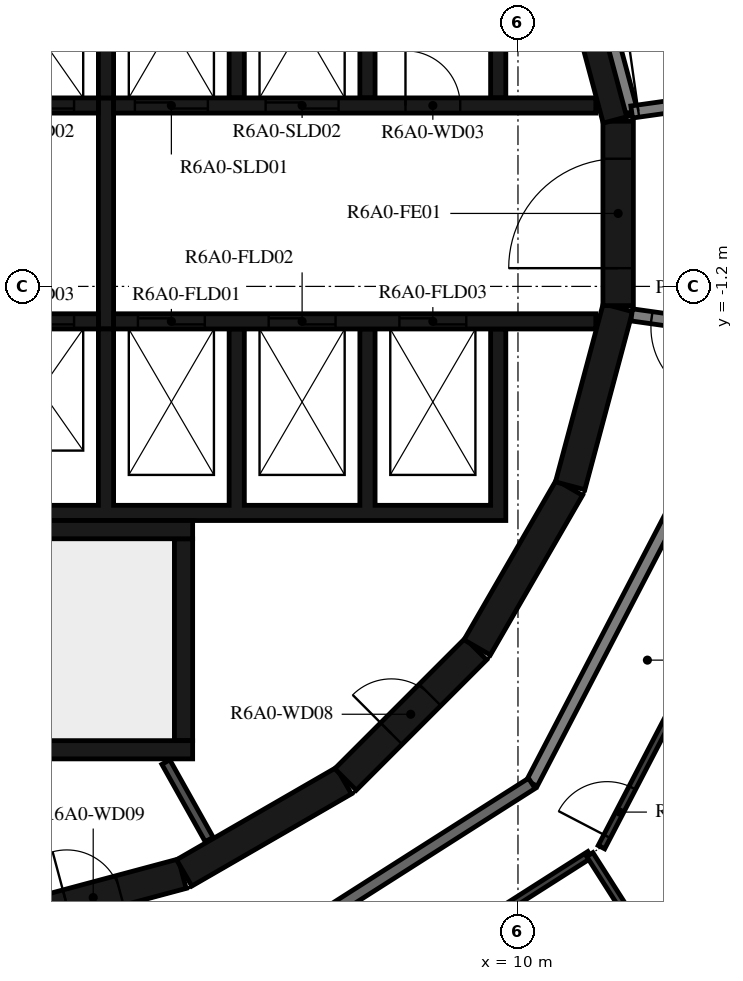
"""IFC4 building model, lengths in metres.
Left out: names, types, materials, properties, quantities, classifications, styles, units other than length and angle.
Written with IfcOpenShell. Run it as: python <this file> out.ifc"""

import sys

from ifc_helpers import new_model, si_unit, direction, frame, frame_2d, origin, place, context, subcontext, project, spatial, polyline, rectangle, outline, extrude, element, fill, save


model = new_model("IFC4")
c1 = context("Model", 3, precision=1e-05, world=origin(), true_north=direction((0.0, 1.0)))
c2 = subcontext(c1, "Body", "Model", "MODEL_VIEW")
j1 = project(units=[si_unit("LENGTHUNIT", "METRE"), si_unit("PLANEANGLEUNIT", "RADIAN")], contexts=[c1])
p1 = place(None, origin())
s1 = spatial("IfcSite", under=j1, at=p1, CompositionType="ELEMENT")
p2 = place(p1, origin())
s2 = spatial("IfcBuilding", under=s1, at=p2, CompositionType="ELEMENT")
p3 = place(p2, frame((0.0, 0.0, 233.7)))
s3 = spatial("IfcBuildingStorey", under=s2, at=p3, CompositionType="ELEMENT", Elevation=233.7)
p4 = place(p3, frame((1.55, -11.643, 0.0), z_axis=(0.0, 0.0, 1.0), x_axis=(0.965948410781, 0.258734743916, 0.0)))
e1 = element("IfcWall", 1, at=p4, inside=s3, PredefinedType="SHEAR", context=c2, shape_type="SweptSolid", body=[
    extrude(rectangle(XDim=3.033, YDim=0.5, at=frame_2d((1.516, 0.0))), origin(), (0.0, 0.0, 1.0), 3.12),
])
p5 = place(p4, frame((1.066, 0.0, 0.0)))
e2 = element("IfcOpeningElement", 2, at=p5, cuts=e1, PredefinedType="OPENING", context=c2, shape_type="SweptSolid", body=[
    extrude(rectangle(XDim=0.9, YDim=2.1, at=frame_2d((0.45, 1.05))), frame((0.0, 0.26, 0.0), z_axis=(0.0, -1.0, 0.0), x_axis=(1.0, 0.0, 0.0)), (0.0, 0.0, 1.0), 0.52),
])
p6 = place(p3, frame((4.51, -10.845, 0.0), z_axis=(0.0, 0.0, 1.0), x_axis=(0.865975092491, 0.500087131594, 0.0)))
e3 = element("IfcWall", 3, at=p6, inside=s3, PredefinedType="SHEAR", context=c2, shape_type="SweptSolid", body=[
    extrude(rectangle(XDim=3.033, YDim=0.5, at=frame_2d((1.516, 0.0))), origin(), (0.0, 0.0, 1.0), 3.12),
])
p7 = place(p3, frame((7.164, -9.308, 0.0), z_axis=(0.0, 0.0, 1.0), x_axis=(0.707106781187, 0.707106781187, 0.0)))
e4 = element("IfcWall", 4, at=p7, inside=s3, PredefinedType="SHEAR", context=c2, shape_type="SweptSolid", body=[
    extrude(rectangle(XDim=3.032, YDim=0.5, at=frame_2d((1.516, 0.0))), origin(), (0.0, 0.0, 1.0), 3.12),
])
p8 = place(p7, frame((1.066, 0.0, 0.0)))
e5 = element("IfcOpeningElement", 5, at=p8, cuts=e4, PredefinedType="OPENING", context=c2, shape_type="SweptSolid", body=[
    extrude(rectangle(XDim=0.9, YDim=2.1, at=frame_2d((0.45, 1.05))), frame((0.0, 0.26, 0.0), z_axis=(0.0, -1.0, 0.0), x_axis=(1.0, 0.0, 0.0)), (0.0, 0.0, 1.0), 0.52),
])
for number, where, z_axis, x_axis in (
    (6, (9.329, -7.137, 0.0), (0.0, 0.0, 1.0), (0.5, 0.866, 0.0)),
    (7, (10.858, -4.479, 0.0), (0.0, 0.0, 1.0), (0.259, 0.966, 0.0)),
):
    element("IfcWall", number, at=place(p3, frame(where, z_axis=z_axis, x_axis=x_axis)), inside=s3, PredefinedType="SHEAR", context=c2, shape_type="SweptSolid", body=[
        extrude(rectangle(XDim=3.033, YDim=0.5, at=frame_2d((1.516, 0.0))), origin(), (0.0, 0.0, 1.0), 3.12),
    ])
p9 = place(p3, frame((11.647, -1.516, 0.0), z_axis=(0.0, 0.0, 1.0), x_axis=(0.0, 1.0, 0.0)))
e8 = element("IfcWall", 8, at=p9, inside=s3, PredefinedType="SHEAR", context=c2, shape_type="SweptSolid", body=[
    extrude(rectangle(XDim=3.033, YDim=0.5, at=frame_2d((1.516, 0.0))), origin(), (0.0, 0.0, 1.0), 3.12),
])
p10 = place(p9, frame((0.616, 0.0, 0.0)))
e9 = element("IfcOpeningElement", 9, at=p10, cuts=e8, PredefinedType="OPENING", context=c2, shape_type="SweptSolid", body=[
    extrude(rectangle(XDim=1.8, YDim=2.1, at=frame_2d((0.9, 1.05))), frame((0.0, 0.26, 0.0), z_axis=(0.0, -1.0, 0.0), x_axis=(1.0, 0.0, 0.0)), (0.0, 0.0, 1.0), 0.52),
])
p11 = place(p3, frame((11.643, 1.55, 0.0), z_axis=(0.0, 0.0, 1.0), x_axis=(-0.258734743916, 0.965948410781, 0.0)))
e10 = element("IfcWall", 10, at=p11, inside=s3, PredefinedType="SHEAR", context=c2, shape_type="SweptSolid", body=[
    extrude(rectangle(XDim=3.033, YDim=0.5, at=frame_2d((1.516, 0.0))), origin(), (0.0, 0.0, 1.0), 3.12),
])
p12 = place(p3, frame((-2.4, -5.2, 0.0), z_axis=(0.0, 0.0, 1.0), x_axis=(1.0, 0.0, 0.0)))
e11 = element("IfcWall", 11, at=p12, inside=s3, PredefinedType="SHEAR", context=c2, shape_type="SweptSolid", body=[
    extrude(rectangle(XDim=7.05, YDim=0.3, at=frame_2d((3.525, 0.0))), origin(), (0.0, 0.0, 1.0), 3.12),
])
p13 = place(p3, frame((4.5, -8.67, 0.0), z_axis=(0.0, 0.0, 1.0), x_axis=(0.0, 1.0, 0.0)))
e12 = element("IfcWall", 12, at=p13, inside=s3, PredefinedType="SHEAR", context=c2, shape_type="SweptSolid", body=[
    extrude(rectangle(XDim=3.32, YDim=0.3, at=frame_2d((1.66, 0.0))), origin(), (0.0, 0.0, 1.0), 3.12),
])
p14 = place(p3, frame((0.1, -8.82, 0.0), z_axis=(0.0, 0.0, 1.0), x_axis=(1.0, 0.0, 0.0)))
e13 = element("IfcWall", 13, at=p14, inside=s3, PredefinedType="SHEAR", context=c2, shape_type="SweptSolid", body=[
    extrude(rectangle(XDim=4.55, YDim=0.3, at=frame_2d((2.275, 0.0))), origin(), (0.0, 0.0, 1.0), 3.12),
])
p15 = place(p3, origin())
e14 = element("IfcWall", 14, at=p15, inside=s3, PredefinedType="SHEAR", context=c2, shape_type="SweptSolid", body=[
    extrude(outline(polyline([(-9.55, 4.8), (-5.5, 4.8), (-5.5, 1.9), (-5.25, 1.9), (-5.25, 4.8), (-1.2, 4.8), (-1.2, 1.9), (-0.95, 1.9), (-0.95, 4.8), (0.95, 4.8), (0.95, 1.9), (1.2, 1.9), (1.2, 4.8), (3.1, 4.8), (3.1, 1.9), (3.35, 1.9), (3.35, 4.8), (5.25, 4.8), (5.25, 1.9), (5.5, 1.9), (5.5, 4.8), (7.4, 4.8), (7.4, 1.9), (7.65, 1.9), (7.65, 4.8), (9.55, 4.8), (9.55, 1.9), (9.8, 1.9), (9.8, 4.8), (9.8, 5.05), (-9.8, 5.05), (-9.8, 4.8), (-9.8, 1.9), (-9.55, 1.9), (-9.55, 4.8)])), origin(), (0.0, 0.0, 1.0), 3.12),
])
p16 = place(p3, origin())
e15 = element("IfcWall", 15, at=p16, inside=s3, PredefinedType="SHEAR", context=c2, shape_type="SweptSolid", body=[
    extrude(outline(polyline([(9.8, -5.05), (9.8, -4.8), (9.8, -1.9), (9.55, -1.9), (9.55, -4.8), (7.65, -4.8), (7.65, -1.9), (7.4, -1.9), (7.4, -4.8), (5.5, -4.8), (5.5, -1.9), (5.25, -1.9), (5.25, -4.8), (3.35, -4.8), (3.35, -1.9), (3.1, -1.9), (3.1, -4.8), (1.2, -4.8), (1.2, -1.9), (0.95, -1.9), (0.95, -4.8), (-0.95, -4.8), (-0.95, -1.9), (-1.2, -1.9), (-1.2, -4.8), (-5.25, -4.8), (-5.25, -1.9), (-5.5, -1.9), (-5.5, -4.8), (-7.4, -4.8), (-7.4, -1.9), (-7.65, -1.9), (-7.65, -4.8), (-9.55, -4.8), (-9.55, -1.9), (-9.8, -1.9), (-9.8, -4.8), (-9.8, -5.05), (9.8, -5.05)])), origin(), (0.0, 0.0, 1.0), 3.12),
])
p17 = place(p3, frame((-11.28, 1.775, 0.0), z_axis=(0.0, 0.0, 1.0), x_axis=(1.0, 0.0, 0.0)))
e16 = element("IfcWall", 16, at=p17, inside=s3, PredefinedType="SHEAR", context=c2, shape_type="SweptSolid", body=[
    extrude(rectangle(XDim=14.38, YDim=0.25, at=frame_2d((7.19, 0.0))), origin(), (0.0, 0.0, 1.0), 3.12),
])
p18 = place(p17, frame((10.73, 0.0, 0.0)))
e17 = element("IfcOpeningElement", 17, at=p18, cuts=e16, PredefinedType="OPENING", context=c2, shape_type="SweptSolid", body=[
    extrude(rectangle(XDim=1.1, YDim=2.1, at=frame_2d((0.55, 1.05))), frame((0.0, 0.135, 0.0), z_axis=(0.0, -1.0, 0.0), x_axis=(1.0, 0.0, 0.0)), (0.0, 0.0, 1.0), 0.27),
])
p19 = place(p17, frame((12.88, 0.0, 0.0)))
e18 = element("IfcOpeningElement", 18, at=p19, cuts=e16, PredefinedType="OPENING", context=c2, shape_type="SweptSolid", body=[
    extrude(rectangle(XDim=1.1, YDim=2.1, at=frame_2d((0.55, 1.05))), frame((0.0, 0.135, 0.0), z_axis=(0.0, -1.0, 0.0), x_axis=(1.0, 0.0, 0.0)), (0.0, 0.0, 1.0), 0.27),
])
p20 = place(p17, frame((3.305, 0.0, 0.0)))
e19 = element("IfcOpeningElement", 19, at=p20, cuts=e16, PredefinedType="OPENING", context=c2, shape_type="SweptSolid", body=[
    extrude(rectangle(XDim=0.9, YDim=2.1, at=frame_2d((0.45, 1.05))), frame((0.0, 0.135, 0.0), z_axis=(0.0, -1.0, 0.0), x_axis=(1.0, 0.0, 0.0)), (0.0, 0.0, 1.0), 0.27),
])
p21 = place(p17, frame((7.605, 0.0, 0.0)))
e20 = element("IfcOpeningElement", 20, at=p21, cuts=e16, PredefinedType="OPENING", context=c2, shape_type="SweptSolid", body=[
    extrude(rectangle(XDim=0.9, YDim=2.1, at=frame_2d((0.45, 1.05))), frame((0.0, 0.135, 0.0), z_axis=(0.0, -1.0, 0.0), x_axis=(1.0, 0.0, 0.0)), (0.0, 0.0, 1.0), 0.27),
])
p22 = place(p3, frame((3.35, 1.775, 0.0), z_axis=(0.0, 0.0, 1.0), x_axis=(1.0, 0.0, 0.0)))
e21 = element("IfcWall", 21, at=p22, inside=s3, PredefinedType="SHEAR", context=c2, shape_type="SweptSolid", body=[
    extrude(rectangle(XDim=7.93, YDim=0.25, at=frame_2d((3.965, 0.0))), origin(), (0.0, 0.0, 1.0), 3.12),
])
p23 = place(p22, frame((0.35, 0.0, 0.0)))
e22 = element("IfcOpeningElement", 22, at=p23, cuts=e21, PredefinedType="OPENING", context=c2, shape_type="SweptSolid", body=[
    extrude(rectangle(XDim=1.2, YDim=2.4, at=frame_2d((0.6, 1.2))), frame((0.0, 0.135, 0.0), z_axis=(0.0, -1.0, 0.0), x_axis=(1.0, 0.0, 0.0)), (0.0, 0.0, 1.0), 0.27),
])
p24 = place(p22, frame((2.5, 0.0, 0.0)))
e23 = element("IfcOpeningElement", 23, at=p24, cuts=e21, PredefinedType="OPENING", context=c2, shape_type="SweptSolid", body=[
    extrude(rectangle(XDim=1.2, YDim=2.4, at=frame_2d((0.6, 1.2))), frame((0.0, 0.135, 0.0), z_axis=(0.0, -1.0, 0.0), x_axis=(1.0, 0.0, 0.0)), (0.0, 0.0, 1.0), 0.27),
])
p25 = place(p22, frame((4.8, 0.0, 0.0)))
e24 = element("IfcOpeningElement", 24, at=p25, cuts=e21, PredefinedType="OPENING", context=c2, shape_type="SweptSolid", body=[
    extrude(rectangle(XDim=0.9, YDim=2.1, at=frame_2d((0.45, 1.05))), frame((0.0, 0.135, 0.0), z_axis=(0.0, -1.0, 0.0), x_axis=(1.0, 0.0, 0.0)), (0.0, 0.0, 1.0), 0.27),
])
p26 = place(p3, frame((-11.28, -1.775, 0.0), z_axis=(0.0, 0.0, 1.0), x_axis=(1.0, 0.0, 0.0)))
e25 = element("IfcWall", 25, at=p26, inside=s3, PredefinedType="SHEAR", context=c2, shape_type="SweptSolid", body=[
    extrude(rectangle(XDim=14.38, YDim=0.25, at=frame_2d((7.19, 0.0))), origin(), (0.0, 0.0, 1.0), 3.12),
])
p27 = place(p26, frame((12.88, 0.0, 0.0)))
e26 = element("IfcOpeningElement", 26, at=p27, cuts=e25, PredefinedType="OPENING", context=c2, shape_type="SweptSolid", body=[
    extrude(rectangle(XDim=1.1, YDim=2.1, at=frame_2d((0.55, 1.05))), frame((0.0, 0.135, 0.0), z_axis=(0.0, -1.0, 0.0), x_axis=(1.0, 0.0, 0.0)), (0.0, 0.0, 1.0), 0.27),
])
p28 = place(p26, frame((7.605, 0.0, 0.0)))
e27 = element("IfcOpeningElement", 27, at=p28, cuts=e25, PredefinedType="OPENING", context=c2, shape_type="SweptSolid", body=[
    extrude(rectangle(XDim=0.9, YDim=2.1, at=frame_2d((0.45, 1.05))), frame((0.0, 0.135, 0.0), z_axis=(0.0, -1.0, 0.0), x_axis=(1.0, 0.0, 0.0)), (0.0, 0.0, 1.0), 0.27),
])
p29 = place(p26, frame((10.83, 0.0, 0.0)))
e28 = element("IfcOpeningElement", 28, at=p29, cuts=e25, PredefinedType="OPENING", context=c2, shape_type="SweptSolid", body=[
    extrude(rectangle(XDim=0.9, YDim=2.1, at=frame_2d((0.45, 1.05))), frame((0.0, 0.135, 0.0), z_axis=(0.0, -1.0, 0.0), x_axis=(1.0, 0.0, 0.0)), (0.0, 0.0, 1.0), 0.27),
])
p30 = place(p3, frame((3.35, -1.775, 0.0), z_axis=(0.0, 0.0, 1.0), x_axis=(1.0, 0.0, 0.0)))
e29 = element("IfcWall", 29, at=p30, inside=s3, PredefinedType="SHEAR", context=c2, shape_type="SweptSolid", body=[
    extrude(rectangle(XDim=7.93, YDim=0.25, at=frame_2d((3.965, 0.0))), origin(), (0.0, 0.0, 1.0), 3.12),
])
p31 = place(p30, frame((0.4, 0.0, 0.0)))
e30 = element("IfcOpeningElement", 30, at=p31, cuts=e29, PredefinedType="OPENING", context=c2, shape_type="SweptSolid", body=[
    extrude(rectangle(XDim=1.1, YDim=2.4, at=frame_2d((0.55, 1.2))), frame((0.0, 0.135, 0.0), z_axis=(0.0, -1.0, 0.0), x_axis=(1.0, 0.0, 0.0)), (0.0, 0.0, 1.0), 0.27),
])
p32 = place(p30, frame((2.55, 0.0, 0.0)))
e31 = element("IfcOpeningElement", 31, at=p32, cuts=e29, PredefinedType="OPENING", context=c2, shape_type="SweptSolid", body=[
    extrude(rectangle(XDim=1.1, YDim=2.4, at=frame_2d((0.55, 1.2))), frame((0.0, 0.135, 0.0), z_axis=(0.0, -1.0, 0.0), x_axis=(1.0, 0.0, 0.0)), (0.0, 0.0, 1.0), 0.27),
])
p33 = place(p30, frame((4.7, 0.0, 0.0)))
e32 = element("IfcOpeningElement", 32, at=p33, cuts=e29, PredefinedType="OPENING", context=c2, shape_type="SweptSolid", body=[
    extrude(rectangle(XDim=1.1, YDim=2.4, at=frame_2d((0.55, 1.2))), frame((0.0, 0.135, 0.0), z_axis=(0.0, -1.0, 0.0), x_axis=(1.0, 0.0, 0.0)), (0.0, 0.0, 1.0), 0.27),
])
p34 = place(p3, frame((3.225, -1.9, 0.0), z_axis=(0.0, 0.0, 1.0), x_axis=(0.0, 1.0, 0.0)))
e33 = element("IfcWall", 33, at=p34, inside=s3, PredefinedType="SHEAR", context=c2, shape_type="SweptSolid", body=[
    extrude(rectangle(XDim=3.8, YDim=0.25, at=frame_2d((1.9, 0.0))), origin(), (0.0, 0.0, 1.0), 3.12),
])
p35 = place(p3, frame((4.922, -10.296, 0.0), z_axis=(0.0, 0.0, 1.0), x_axis=(-0.48860846254, 0.872503163509, 0.0)))
e34 = element("IfcWall", 34, at=p35, inside=s3, PredefinedType="PARTITIONING", context=c2, shape_type="SweptSolid", body=[
    extrude(rectangle(XDim=1.459, YDim=0.15, at=frame_2d((0.73, 0.0))), origin(), (0.0, 0.0, 1.0), 3.12),
])
p36 = place(p3, frame((11.87, 1.668, 0.0), z_axis=(0.0, 0.0, 1.0), x_axis=(-0.258836880648, 0.965921047093, 0.0)))
e35 = element("IfcWall", 35, at=p36, inside=s3, PredefinedType="STANDARD", context=c2, shape_type="SweptSolid", body=[
    extrude(rectangle(XDim=1.695, YDim=0.2, at=frame_2d((0.848, 0.0))), origin(), (0.0, 0.0, 1.0), 3.12),
])
p37 = place(p3, frame((11.87, 1.668, 0.0), z_axis=(0.0, 0.0, 1.0), x_axis=(0.990267985606, 0.139173692496, 0.0)))
e36 = element("IfcWall", 36, at=p37, inside=s3, PredefinedType="STANDARD", context=c2, shape_type="SweptSolid", body=[
    extrude(rectangle(XDim=1.475, YDim=0.2, at=frame_2d((0.738, 0.0))), origin(), (0.0, 0.0, 1.0), 3.12),
])
p38 = place(p37, frame((0.11, 0.0, 0.0)))
e37 = element("IfcOpeningElement", 37, at=p38, cuts=e36, PredefinedType="OPENING", context=c2, shape_type="SweptSolid", body=[
    extrude(rectangle(XDim=1.2, YDim=2.1, at=frame_2d((0.6, 1.05))), frame((0.0, 0.11, 0.0), z_axis=(0.0, -1.0, 0.0), x_axis=(1.0, 0.0, 0.0)), (0.0, 0.0, 1.0), 0.22),
])
p39 = place(p3, frame((10.228, -9.372, 0.0), z_axis=(0.0, 0.0, 1.0), x_axis=(0.461759464021, 0.887005184532, 0.0)))
e38 = element("IfcWall", 38, at=p39, inside=s3, PredefinedType="STANDARD", context=c2, shape_type="SweptSolid", body=[
    extrude(rectangle(XDim=7.181, YDim=0.2, at=frame_2d((3.591, 0.0))), origin(), (0.0, 0.0, 1.0), 3.12),
])
p40 = place(p3, frame((13.496, -1.897, 0.0), z_axis=(0.0, 0.0, 1.0), x_axis=(-0.99026234641, 0.139213811391, 0.0)))
e39 = element("IfcWall", 39, at=p40, inside=s3, PredefinedType="STANDARD", context=c2, shape_type="SweptSolid", body=[
    extrude(rectangle(XDim=1.641, YDim=0.2, at=frame_2d((0.821, 0.0))), origin(), (0.0, 0.0, 1.0), 3.12),
])
p41 = place(p40, frame((0.11, 0.0, 0.0)))
e40 = element("IfcOpeningElement", 40, at=p41, cuts=e39, PredefinedType="OPENING", context=c2, shape_type="SweptSolid", body=[
    extrude(rectangle(XDim=1.2, YDim=2.1, at=frame_2d((0.6, 1.05))), frame((0.0, 0.11, 0.0), z_axis=(0.0, -1.0, 0.0), x_axis=(1.0, 0.0, 0.0)), (0.0, 0.0, 1.0), 0.22),
])
p42 = place(p3, frame((4.172, -13.231, 0.0), z_axis=(0.0, 0.0, 1.0), x_axis=(0.843388394728, 0.537304397561, 0.0)))
e41 = element("IfcWall", 41, at=p42, inside=s3, PredefinedType="STANDARD", context=c2, shape_type="SweptSolid", body=[
    extrude(rectangle(XDim=7.181, YDim=0.2, at=frame_2d((3.59, 0.0))), origin(), (0.0, 0.0, 1.0), 3.12),
])
p43 = place(p42, frame((0.2, 0.0, 0.0)))
e42 = element("IfcOpeningElement", 42, at=p43, cuts=e41, PredefinedType="OPENING", context=c2, shape_type="SweptSolid", body=[
    extrude(rectangle(XDim=1.0, YDim=2.1, at=frame_2d((0.5, 1.05))), frame((0.0, 0.11, 0.0), z_axis=(0.0, -1.0, 0.0), x_axis=(1.0, 0.0, 0.0)), (0.0, 0.0, 1.0), 0.22),
])
p44 = place(p3, frame((4.83, -14.59, 0.0), z_axis=(0.0, 0.0, 1.0), x_axis=(0.843393042763, 0.537297101629, 0.0)))
e43 = element("IfcWall", 43, at=p44, inside=s3, PredefinedType="PARTITIONING", context=c2, shape_type="SweptSolid", body=[
    extrude(rectangle(XDim=7.53, YDim=0.12, at=frame_2d((3.765, 0.0))), origin(), (0.0, 0.0, 1.0), 3.12),
])
p45 = place(p44, frame((0.2, 0.0, 0.0)))
e44 = element("IfcOpeningElement", 44, at=p45, cuts=e43, PredefinedType="OPENING", context=c2, shape_type="SweptSolid", body=[
    extrude(rectangle(XDim=0.9, YDim=2.1, at=frame_2d((0.45, 1.05))), frame((0.0, 0.07, 0.0), z_axis=(0.0, -1.0, 0.0), x_axis=(1.0, 0.0, 0.0)), (0.0, 0.0, 1.0), 0.14),
])
p46 = place(p3, frame((11.373, -10.421, 0.0), z_axis=(0.0, 0.0, 1.0), x_axis=(0.461738939635, 0.887015868869, 0.0)))
e45 = element("IfcWall", 45, at=p46, inside=s3, PredefinedType="PARTITIONING", context=c2, shape_type="SweptSolid", body=[
    extrude(rectangle(XDim=5.752, YDim=0.12, at=frame_2d((2.876, 0.0))), origin(), (0.0, 0.0, 1.0), 3.12),
])
p47 = place(p46, frame((0.2, 0.0, 0.0)))
e46 = element("IfcOpeningElement", 46, at=p47, cuts=e45, PredefinedType="OPENING", context=c2, shape_type="SweptSolid", body=[
    extrude(rectangle(XDim=0.9, YDim=2.1, at=frame_2d((0.45, 1.05))), frame((0.0, 0.07, 0.0), z_axis=(0.0, -1.0, 0.0), x_axis=(1.0, 0.0, 0.0)), (0.0, 0.0, 1.0), 0.14),
])
p48 = place(p3, frame((12.758, -13.018, 0.0), z_axis=(0.0, 0.0, 1.0), x_axis=(-0.537338423153, 0.843366716798, 0.0)))
e47 = element("IfcWall", 47, at=p48, inside=s3, PredefinedType="PARTITIONING", context=c2, shape_type="SweptSolid", body=[
    extrude(rectangle(XDim=2.934, YDim=0.12, at=frame_2d((1.467, 0.0))), origin(), (0.0, 0.0, 1.0), 2.73),
])
p49 = place(p10, origin())
e48 = element("IfcDoor", 48, at=p49, inside=s3, OperationType="DOUBLE_DOOR_SINGLE_SWING", PredefinedType="DOOR", context=c2, shape_type="SweptSolid", body=[
    extrude(rectangle(XDim=1.8, YDim=2.1, at=frame_2d((0.9, 1.05))), frame((0.0, 0.025, 0.0), z_axis=(0.0, -1.0, 0.0), x_axis=(1.0, 0.0, 0.0)), (0.0, 0.0, 1.0), 0.05),
])
fill(e9, e48)
p50 = place(p19, origin())
e49 = element("IfcDoor", 49, at=p50, inside=s3, OperationType="DOUBLE_DOOR_SLIDING", PredefinedType="DOOR", context=c2, shape_type="SweptSolid", body=[
    extrude(rectangle(XDim=1.1, YDim=2.1, at=frame_2d((0.55, 1.05))), frame((0.0, 0.025, 0.0), z_axis=(0.0, -1.0, 0.0), x_axis=(1.0, 0.0, 0.0)), (0.0, 0.0, 1.0), 0.05),
])
fill(e18, e49)
p51 = place(p23, origin())
e50 = element("IfcDoor", 50, at=p51, inside=s3, OperationType="DOUBLE_DOOR_SLIDING", PredefinedType="DOOR", context=c2, shape_type="SweptSolid", body=[
    extrude(rectangle(XDim=1.2, YDim=2.4, at=frame_2d((0.6, 1.2))), frame((0.0, 0.025, 0.0), z_axis=(0.0, -1.0, 0.0), x_axis=(1.0, 0.0, 0.0)), (0.0, 0.0, 1.0), 0.05),
])
fill(e22, e50)
p52 = place(p24, origin())
e51 = element("IfcDoor", 51, at=p52, inside=s3, OperationType="DOUBLE_DOOR_SLIDING", PredefinedType="DOOR", context=c2, shape_type="SweptSolid", body=[
    extrude(rectangle(XDim=1.2, YDim=2.4, at=frame_2d((0.6, 1.2))), frame((0.0, 0.025, 0.0), z_axis=(0.0, -1.0, 0.0), x_axis=(1.0, 0.0, 0.0)), (0.0, 0.0, 1.0), 0.05),
])
fill(e23, e51)
p53 = place(p27, origin())
e52 = element("IfcDoor", 52, at=p53, inside=s3, OperationType="DOUBLE_DOOR_SLIDING", PredefinedType="DOOR", context=c2, shape_type="SweptSolid", body=[
    extrude(rectangle(XDim=1.1, YDim=2.1, at=frame_2d((0.55, 1.05))), frame((0.0, 0.025, 0.0), z_axis=(0.0, -1.0, 0.0), x_axis=(1.0, 0.0, 0.0)), (0.0, 0.0, 1.0), 0.05),
])
fill(e26, e52)
p54 = place(p31, origin())
e53 = element("IfcDoor", 53, at=p54, inside=s3, OperationType="DOUBLE_DOOR_SLIDING", PredefinedType="DOOR", context=c2, shape_type="SweptSolid", body=[
    extrude(rectangle(XDim=1.1, YDim=2.4, at=frame_2d((0.55, 1.2))), frame((0.0, 0.025, 0.0), z_axis=(0.0, -1.0, 0.0), x_axis=(1.0, 0.0, 0.0)), (0.0, 0.0, 1.0), 0.05),
])
fill(e30, e53)
p55 = place(p32, origin())
e54 = element("IfcDoor", 54, at=p55, inside=s3, OperationType="DOUBLE_DOOR_SLIDING", PredefinedType="DOOR", context=c2, shape_type="SweptSolid", body=[
    extrude(rectangle(XDim=1.1, YDim=2.4, at=frame_2d((0.55, 1.2))), frame((0.0, 0.025, 0.0), z_axis=(0.0, -1.0, 0.0), x_axis=(1.0, 0.0, 0.0)), (0.0, 0.0, 1.0), 0.05),
])
fill(e31, e54)
p56 = place(p33, origin())
e55 = element("IfcDoor", 55, at=p56, inside=s3, OperationType="DOUBLE_DOOR_SLIDING", PredefinedType="DOOR", context=c2, shape_type="SweptSolid", body=[
    extrude(rectangle(XDim=1.1, YDim=2.4, at=frame_2d((0.55, 1.2))), frame((0.0, 0.025, 0.0), z_axis=(0.0, -1.0, 0.0), x_axis=(1.0, 0.0, 0.0)), (0.0, 0.0, 1.0), 0.05),
])
fill(e32, e55)
p57 = place(p25, origin())
e56 = element("IfcDoor", 56, at=p57, inside=s3, OperationType="SINGLE_SWING_LEFT", PredefinedType="DOOR", context=c2, shape_type="SweptSolid", body=[
    extrude(rectangle(XDim=0.9, YDim=2.1, at=frame_2d((0.45, 1.05))), frame((0.0, 0.025, 0.0), z_axis=(0.0, -1.0, 0.0), x_axis=(1.0, 0.0, 0.0)), (0.0, 0.0, 1.0), 0.05),
])
fill(e24, e56)
p58 = place(p8, origin())
e57 = element("IfcDoor", 57, at=p58, inside=s3, OperationType="SINGLE_SWING_RIGHT", PredefinedType="DOOR", context=c2, shape_type="SweptSolid", body=[
    extrude(rectangle(XDim=0.9, YDim=2.1, at=frame_2d((0.45, 1.05))), frame((0.0, 0.025, 0.0), z_axis=(0.0, -1.0, 0.0), x_axis=(1.0, 0.0, 0.0)), (0.0, 0.0, 1.0), 0.05),
])
fill(e5, e57)
p59 = place(p5, origin())
e58 = element("IfcDoor", 58, at=p59, inside=s3, OperationType="SINGLE_SWING_LEFT", PredefinedType="DOOR", context=c2, shape_type="SweptSolid", body=[
    extrude(rectangle(XDim=0.9, YDim=2.1, at=frame_2d((0.45, 1.05))), frame((0.0, 0.025, 0.0), z_axis=(0.0, -1.0, 0.0), x_axis=(1.0, 0.0, 0.0)), (0.0, 0.0, 1.0), 0.05),
])
fill(e2, e58)
p60 = place(p47, origin())
e59 = element("IfcDoor", 59, at=p60, inside=s3, OperationType="SINGLE_SWING_RIGHT", PredefinedType="DOOR", context=c2, shape_type="SweptSolid", body=[
    extrude(rectangle(XDim=0.9, YDim=2.1, at=frame_2d((0.45, 1.05))), frame((0.0, 0.025, 0.0), z_axis=(0.0, -1.0, 0.0), x_axis=(1.0, 0.0, 0.0)), (0.0, 0.0, 1.0), 0.05),
])
fill(e46, e59)
p61 = place(p38, origin())
e60 = element("IfcDoor", 60, at=p61, inside=s3, OperationType="DOUBLE_DOOR_SINGLE_SWING", PredefinedType="DOOR", context=c2, shape_type="SweptSolid", body=[
    extrude(rectangle(XDim=1.2, YDim=2.1, at=frame_2d((0.6, 1.05))), frame((0.0, 0.025, 0.0), z_axis=(0.0, -1.0, 0.0), x_axis=(1.0, 0.0, 0.0)), (0.0, 0.0, 1.0), 0.05),
])
fill(e37, e60)
p62 = place(p41, origin())
e61 = element("IfcDoor", 61, at=p62, inside=s3, OperationType="DOUBLE_DOOR_SINGLE_SWING", PredefinedType="DOOR", context=c2, shape_type="SweptSolid", body=[
    extrude(rectangle(XDim=1.2, YDim=2.1, at=frame_2d((0.6, 1.05))), frame((0.0, 0.025, 0.0), z_axis=(0.0, -1.0, 0.0), x_axis=(1.0, 0.0, 0.0)), (0.0, 0.0, 1.0), 0.05),
])
fill(e40, e61)
save(model, sys.argv[1])
